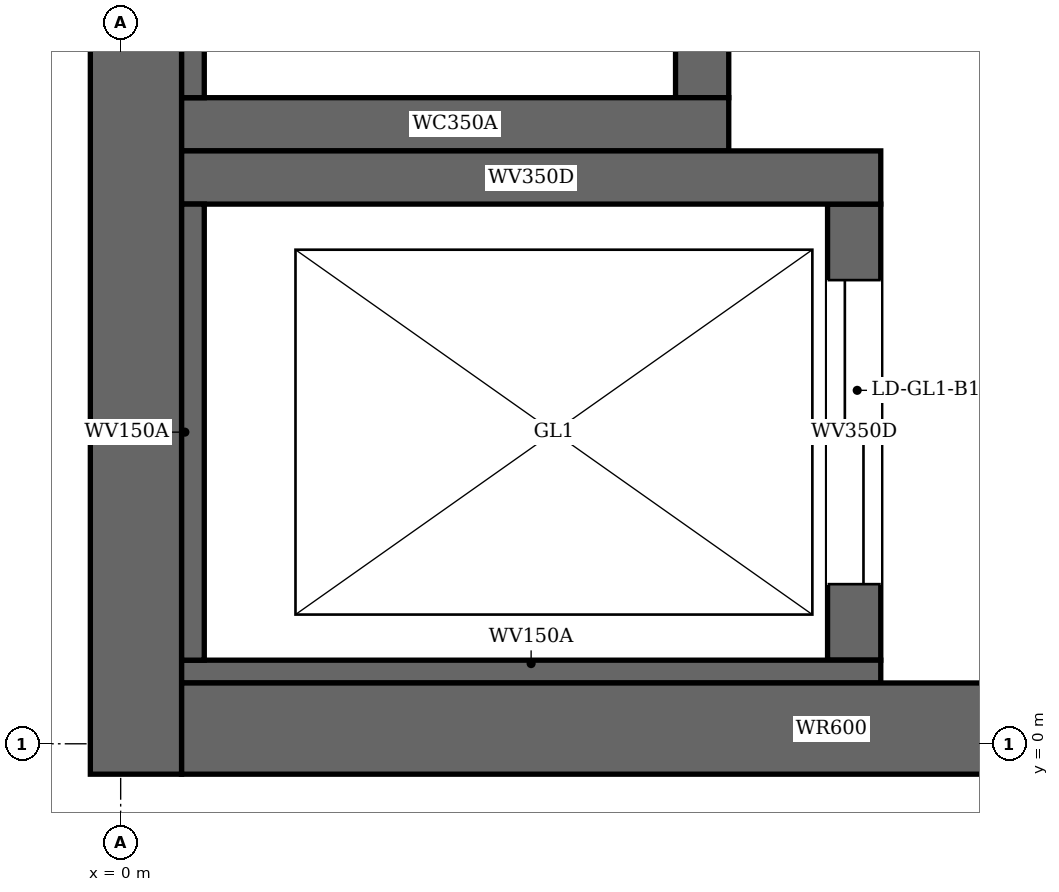
"""IFC4 building model, lengths in metres.
Left out: names, types, materials, properties, quantities, classifications, styles, units other than length and angle.
Written with IfcOpenShell. Run it as: python <this file> out.ifc"""

import sys

from ifc_helpers import new_model, si_unit, direction, frame, frame_2d, origin, place, context, subcontext, project, spatial, rectangle, extrude, element, fill, save


model = new_model("IFC4")
c1 = context("Model", 3, precision=1e-05, world=origin(), true_north=direction((0.0, 1.0)))
c2 = subcontext(c1, "Body", "Model", "MODEL_VIEW")
j1 = project(units=[si_unit("LENGTHUNIT", "METRE"), si_unit("PLANEANGLEUNIT", "RADIAN")], contexts=[c1])
p1 = place(None, origin())
s1 = spatial("IfcSite", under=j1, at=p1, CompositionType="ELEMENT")
p2 = place(p1, origin())
s2 = spatial("IfcBuilding", under=s1, at=p2, CompositionType="ELEMENT")
p3 = place(p2, frame((0.0, 0.0, -5.5)))
s3 = spatial("IfcBuildingStorey", under=s2, at=p3, CompositionType="ELEMENT", Elevation=-5.5)
p4 = place(p3, frame((0.101, -0.2, 0.0), z_axis=(0.0, 0.0, 1.0), x_axis=(0.0, 1.0, 0.0)))
e1 = element("IfcWall", 1, at=p4, inside=s3, PredefinedType="SOLIDWALL", context=c2, shape_type="SweptSolid", body=[
    extrude(rectangle(XDim=46.88, YDim=0.6, at=frame_2d((23.44, 0.0))), origin(), (0.0, 0.0, 1.0), 5.5),
])
p5 = place(p3, frame((0.4, 0.1, 0.0), z_axis=(0.0, 0.0, 1.0), x_axis=(1.0, 0.0, 0.0)))
e2 = element("IfcWall", 2, at=p5, inside=s3, PredefinedType="SOLIDWALL", context=c2, shape_type="SweptSolid", body=[
    extrude(rectangle(XDim=8.55, YDim=0.6, at=frame_2d((4.275, 0.0))), origin(), (0.0, 0.0, 1.0), 5.5),
])
p6 = place(p3, frame((0.4, 0.475, -1.6), z_axis=(0.0, 0.0, 1.0), x_axis=(1.0, 0.0, 0.0)))
e3 = element("IfcWall", 3, at=p6, inside=s3, PredefinedType="SHEAR", context=c2, shape_type="SweptSolid", body=[
    extrude(rectangle(XDim=4.6, YDim=0.15, at=frame_2d((2.3, 0.0))), origin(), (0.0, 0.0, 1.0), 7.1),
])
p7 = place(p3, frame((0.4, 3.725, -1.6), z_axis=(0.0, 0.0, 1.0), x_axis=(1.0, 0.0, 0.0)))
e4 = element("IfcWall", 4, at=p7, inside=s3, PredefinedType="SHEAR", context=c2, shape_type="SweptSolid", body=[
    extrude(rectangle(XDim=4.6, YDim=0.35, at=frame_2d((2.3, 0.0))), origin(), (0.0, 0.0, 1.0), 7.1),
])
p8 = place(p3, frame((0.475, 0.55, -1.6), z_axis=(0.0, 0.0, 1.0), x_axis=(0.0, 1.0, 0.0)))
e5 = element("IfcWall", 5, at=p8, inside=s3, PredefinedType="SHEAR", context=c2, shape_type="SweptSolid", body=[
    extrude(rectangle(XDim=3.0, YDim=0.15, at=frame_2d((1.5, 0.0))), origin(), (0.0, 0.0, 1.0), 7.1),
])
p9 = place(p3, frame((4.825, 0.55, -1.6), z_axis=(0.0, 0.0, 1.0), x_axis=(0.0, 1.0, 0.0)))
e6 = element("IfcWall", 6, at=p9, inside=s3, PredefinedType="SHEAR", context=c2, shape_type="SweptSolid", body=[
    extrude(rectangle(XDim=3.0, YDim=0.35, at=frame_2d((1.5, 0.0))), origin(), (0.0, 0.0, 1.0), 7.1),
])
p10 = place(p9, frame((0.5, 0.0, 1.6)))
e7 = element("IfcOpeningElement", 7, at=p10, cuts=e6, PredefinedType="OPENING", context=c2, shape_type="SweptSolid", body=[
    extrude(rectangle(XDim=2.0, YDim=2.4, at=frame_2d((1.0, 1.2))), frame((0.0, 0.185, 0.0), z_axis=(0.0, -1.0, 0.0), x_axis=(1.0, 0.0, 0.0)), (0.0, 0.0, 1.0), 0.37),
])
p11 = place(p3, frame((0.4, 4.075, 0.0), z_axis=(0.0, 0.0, 1.0), x_axis=(1.0, 0.0, 0.0)))
e8 = element("IfcWall", 8, at=p11, inside=s3, PredefinedType="SHEAR", context=c2, shape_type="SweptSolid", body=[
    extrude(rectangle(XDim=3.6, YDim=0.35, at=frame_2d((1.8, 0.0))), origin(), (0.0, 0.0, 1.0), 5.5),
])
p12 = place(p3, frame((0.475, 4.25, 0.0), z_axis=(0.0, 0.0, 1.0), x_axis=(0.0, 1.0, 0.0)))
e9 = element("IfcWall", 9, at=p12, inside=s3, PredefinedType="SHEAR", context=c2, shape_type="SweptSolid", body=[
    extrude(rectangle(XDim=2.2, YDim=0.15, at=frame_2d((1.1, 0.0))), origin(), (0.0, 0.0, 1.0), 5.5),
])
p13 = place(p3, frame((3.825, 4.25, 0.0), z_axis=(0.0, 0.0, 1.0), x_axis=(0.0, 1.0, 0.0)))
e10 = element("IfcWall", 10, at=p13, inside=s3, PredefinedType="SHEAR", context=c2, shape_type="SweptSolid", body=[
    extrude(rectangle(XDim=2.2, YDim=0.35, at=frame_2d((1.1, 0.0))), origin(), (0.0, 0.0, 1.0), 5.5),
])
p14 = place(p10, origin())
e11 = element("IfcDoor", 11, at=p14, inside=s3, OperationType="DOUBLE_DOOR_SLIDING", PredefinedType="DOOR", context=c2, shape_type="SweptSolid", body=[
    extrude(rectangle(XDim=2.0, YDim=2.4, at=frame_2d((1.0, 1.2))), frame((0.0, 0.025, 0.0), z_axis=(0.0, -1.0, 0.0), x_axis=(1.0, 0.0, 0.0)), (0.0, 0.0, 1.0), 0.05),
])
fill(e7, e11)
save(model, sys.argv[1])
